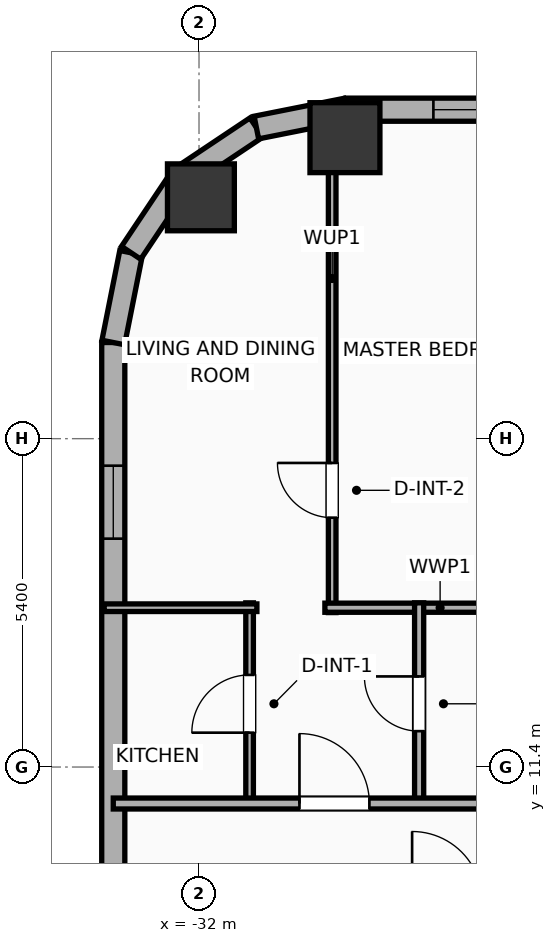
"""IFC4 building model, lengths in metres.
Left out: names, types, materials, properties, quantities, classifications, styles, units other than length and angle.
Written with IfcOpenShell. Run it as: python <this file> out.ifc"""

import sys

from ifc_helpers import new_model, si_unit, direction, frame, frame_2d, origin, origin_2d, place, context, subcontext, project, spatial, rectangle, hollow_rectangle, hollow_circle, extrude, element, fill, save


model = new_model("IFC4")
c1 = context("Model", 3, precision=1e-05, world=origin(), true_north=direction((0.0, 1.0)))
c2 = subcontext(c1, "Body", "Model", "MODEL_VIEW")
j1 = project(units=[si_unit("LENGTHUNIT", "METRE"), si_unit("PLANEANGLEUNIT", "RADIAN")], contexts=[c1])
p1 = place(None, origin())
s1 = spatial("IfcSite", under=j1, at=p1, CompositionType="ELEMENT")
p2 = place(p1, origin())
s2 = spatial("IfcBuilding", under=s1, at=p2, CompositionType="ELEMENT")
p3 = place(p2, frame((0.0, 0.0, 29.9)))
s3 = spatial("IfcBuildingStorey", under=s2, at=p3, CompositionType="ELEMENT", Elevation=29.9)
p4 = place(p3, frame((-29.6, 21.75, 0.0), z_axis=(0.0, 0.0, 1.0), x_axis=(1.0, 0.0, 0.0)))
e1 = element("IfcColumn", 1, at=p4, inside=s3, PredefinedType="COLUMN", context=c2, shape_type="SweptSolid", body=[
    extrude(hollow_rectangle(XDim=1.15, YDim=1.15, WallThickness=0.04, at=origin_2d()), origin(), (0.0, 0.0, 1.0), 3.9),
])
p5 = place(p3, frame((-31.969, 20.769, 0.0), z_axis=(0.0, 0.0, 1.0), x_axis=(1.0, 0.0, 0.0)))
e2 = element("IfcColumn", 2, at=p5, inside=s3, PredefinedType="COLUMN", context=c2, shape_type="SweptSolid", body=[
    extrude(hollow_circle(Radius=0.55, WallThickness=0.036, at=origin_2d()), origin(), (0.0, 0.0, 1.0), 3.9),
])
p6 = place(p3, frame((-33.41, -18.381, 0.0), z_axis=(0.0, 0.0, 1.0), x_axis=(0.0, 1.0, 0.0)))
e3 = element("IfcWall", 3, at=p6, inside=s3, PredefinedType="ELEMENTEDWALL", context=c2, shape_type="SweptSolid", body=[
    extrude(rectangle(XDim=36.763, YDim=0.38, at=frame_2d((18.381, 0.0))), origin(), (0.0, 0.0, 1.0), 2.54),
])
p7 = place(p6, frame((33.537, 0.0, 0.75)))
e4 = element("IfcOpeningElement", 4, at=p7, cuts=e3, PredefinedType="OPENING", context=c2, shape_type="SweptSolid", body=[
    extrude(rectangle(XDim=1.2, YDim=1.63, at=frame_2d((0.6, 0.815))), frame((0.0, 0.2, 0.0), z_axis=(0.0, -1.0, 0.0), x_axis=(1.0, 0.0, 0.0)), (0.0, 0.0, 1.0), 0.4),
])
p8 = place(p6, frame((22.476, 0.0, 0.75)))
e5 = element("IfcOpeningElement", 5, at=p8, cuts=e3, PredefinedType="OPENING", context=c2, shape_type="SweptSolid", body=[
    extrude(rectangle(XDim=1.2, YDim=1.63, at=frame_2d((0.6, 0.815))), frame((0.0, 0.2, 0.0), z_axis=(0.0, -1.0, 0.0), x_axis=(1.0, 0.0, 0.0)), (0.0, 0.0, 1.0), 0.4),
])
p9 = place(p6, frame((13.226, 0.0, 0.75)))
e6 = element("IfcOpeningElement", 6, at=p9, cuts=e3, PredefinedType="OPENING", context=c2, shape_type="SweptSolid", body=[
    extrude(rectangle(XDim=1.2, YDim=1.63, at=frame_2d((0.6, 0.815))), frame((0.0, 0.2, 0.0), z_axis=(0.0, -1.0, 0.0), x_axis=(1.0, 0.0, 0.0)), (0.0, 0.0, 1.0), 0.4),
])
p10 = place(p3, frame((-33.41, 18.381, 0.0), z_axis=(0.0, 0.0, 1.0), x_axis=(0.195086038585, 0.980786132421, 0.0)))
e7 = element("IfcWall", 7, at=p10, inside=s3, PredefinedType="ELEMENTEDWALL", context=c2, shape_type="SweptSolid", body=[
    extrude(rectangle(XDim=1.504, YDim=0.38, at=frame_2d((0.752, 0.0))), origin(), (0.0, 0.0, 1.0), 3.65),
])
p11 = place(p3, frame((-33.116, 19.857, 0.0), z_axis=(0.0, 0.0, 1.0), x_axis=(0.555572577804, 0.831468045563, 0.0)))
e8 = element("IfcWall", 8, at=p11, inside=s3, PredefinedType="ELEMENTEDWALL", context=c2, shape_type="SweptSolid", body=[
    extrude(rectangle(XDim=1.485, YDim=0.38, at=frame_2d((0.742, 0.0))), origin(), (0.0, 0.0, 1.0), 3.65),
])
p12 = place(p3, frame((-32.292, 21.091, 0.0), z_axis=(0.0, 0.0, 1.0), x_axis=(0.831442848281, 0.555610286119, 0.0)))
e9 = element("IfcWall", 9, at=p12, inside=s3, PredefinedType="ELEMENTEDWALL", context=c2, shape_type="SweptSolid", body=[
    extrude(rectangle(XDim=1.485, YDim=0.38, at=frame_2d((0.743, 0.0))), origin(), (0.0, 0.0, 1.0), 2.54),
])
p13 = place(p3, frame((-31.057, 21.917, 0.0), z_axis=(0.0, 0.0, 1.0), x_axis=(0.980786132421, 0.195086038585, 0.0)))
e10 = element("IfcWall", 10, at=p13, inside=s3, PredefinedType="ELEMENTEDWALL", context=c2, shape_type="SweptSolid", body=[
    extrude(rectangle(XDim=1.504, YDim=0.38, at=frame_2d((0.752, 0.0))), origin(), (0.0, 0.0, 1.0), 2.54),
])
p14 = place(p3, frame((-29.581, 22.21, 0.0), z_axis=(0.0, 0.0, 1.0), x_axis=(1.0, 0.0, 0.0)))
e11 = element("IfcWall", 11, at=p14, inside=s3, PredefinedType="ELEMENTEDWALL", context=c2, shape_type="SweptSolid", body=[
    extrude(rectangle(XDim=51.963, YDim=0.38, at=frame_2d((25.981, 0.0))), origin(), (0.0, 0.0, 1.0), 2.54),
])
p15 = place(p14, frame((5.81, 0.0, 0.75)))
e12 = element("IfcOpeningElement", 12, at=p15, cuts=e11, PredefinedType="OPENING", context=c2, shape_type="SweptSolid", body=[
    extrude(rectangle(XDim=2.4, YDim=1.63, at=frame_2d((1.2, 0.815))), frame((0.0, 0.2, 0.0), z_axis=(0.0, -1.0, 0.0), x_axis=(1.0, 0.0, 0.0)), (0.0, 0.0, 1.0), 0.4),
])
p16 = place(p14, frame((42.952, 0.0, 0.75)))
e13 = element("IfcOpeningElement", 13, at=p16, cuts=e11, PredefinedType="OPENING", context=c2, shape_type="SweptSolid", body=[
    extrude(rectangle(XDim=2.4, YDim=1.63, at=frame_2d((1.2, 0.815))), frame((0.0, 0.2, 0.0), z_axis=(0.0, -1.0, 0.0), x_axis=(1.0, 0.0, 0.0)), (0.0, 0.0, 1.0), 0.4),
])
p17 = place(p14, frame((1.436, 0.0, 0.75)))
e14 = element("IfcOpeningElement", 14, at=p17, cuts=e11, PredefinedType="OPENING", context=c2, shape_type="SweptSolid", body=[
    extrude(rectangle(XDim=1.2, YDim=1.63, at=frame_2d((0.6, 0.815))), frame((0.0, 0.2, 0.0), z_axis=(0.0, -1.0, 0.0), x_axis=(1.0, 0.0, 0.0)), (0.0, 0.0, 1.0), 0.4),
])
p18 = place(p14, frame((3.686, 0.0, 0.75)))
e15 = element("IfcOpeningElement", 15, at=p18, cuts=e11, PredefinedType="OPENING", context=c2, shape_type="SweptSolid", body=[
    extrude(rectangle(XDim=1.2, YDim=1.63, at=frame_2d((0.6, 0.815))), frame((0.0, 0.2, 0.0), z_axis=(0.0, -1.0, 0.0), x_axis=(1.0, 0.0, 0.0)), (0.0, 0.0, 1.0), 0.4),
])
p19 = place(p14, frame((11.221, 0.0, 0.75)))
e16 = element("IfcOpeningElement", 16, at=p19, cuts=e11, PredefinedType="OPENING", context=c2, shape_type="SweptSolid", body=[
    extrude(rectangle(XDim=1.2, YDim=1.63, at=frame_2d((0.6, 0.815))), frame((0.0, 0.2, 0.0), z_axis=(0.0, -1.0, 0.0), x_axis=(1.0, 0.0, 0.0)), (0.0, 0.0, 1.0), 0.4),
])
p20 = place(p14, frame((17.686, 0.0, 0.75)))
e17 = element("IfcOpeningElement", 17, at=p20, cuts=e11, PredefinedType="OPENING", context=c2, shape_type="SweptSolid", body=[
    extrude(rectangle(XDim=1.2, YDim=1.63, at=frame_2d((0.6, 0.815))), frame((0.0, 0.2, 0.0), z_axis=(0.0, -1.0, 0.0), x_axis=(1.0, 0.0, 0.0)), (0.0, 0.0, 1.0), 0.4),
])
p21 = place(p14, frame((14.886, 0.0, 0.75)))
e18 = element("IfcOpeningElement", 18, at=p21, cuts=e11, PredefinedType="OPENING", context=c2, shape_type="SweptSolid", body=[
    extrude(rectangle(XDim=1.2, YDim=1.63, at=frame_2d((0.6, 0.815))), frame((0.0, 0.2, 0.0), z_axis=(0.0, -1.0, 0.0), x_axis=(1.0, 0.0, 0.0)), (0.0, 0.0, 1.0), 0.4),
])
p22 = place(p14, frame((22.181, 0.0, 0.75)))
e19 = element("IfcOpeningElement", 19, at=p22, cuts=e11, PredefinedType="OPENING", context=c2, shape_type="SweptSolid", body=[
    extrude(rectangle(XDim=1.2, YDim=1.63, at=frame_2d((0.6, 0.815))), frame((0.0, 0.2, 0.0), z_axis=(0.0, -1.0, 0.0), x_axis=(1.0, 0.0, 0.0)), (0.0, 0.0, 1.0), 0.4),
])
p23 = place(p14, frame((28.926, 0.0, 0.75)))
e20 = element("IfcOpeningElement", 20, at=p23, cuts=e11, PredefinedType="OPENING", context=c2, shape_type="SweptSolid", body=[
    extrude(rectangle(XDim=1.2, YDim=1.63, at=frame_2d((0.6, 0.815))), frame((0.0, 0.2, 0.0), z_axis=(0.0, -1.0, 0.0), x_axis=(1.0, 0.0, 0.0)), (0.0, 0.0, 1.0), 0.4),
])
p24 = place(p14, frame((26.126, 0.0, 0.75)))
e21 = element("IfcOpeningElement", 21, at=p24, cuts=e11, PredefinedType="OPENING", context=c2, shape_type="SweptSolid", body=[
    extrude(rectangle(XDim=1.2, YDim=1.63, at=frame_2d((0.6, 0.815))), frame((0.0, 0.2, 0.0), z_axis=(0.0, -1.0, 0.0), x_axis=(1.0, 0.0, 0.0)), (0.0, 0.0, 1.0), 0.4),
])
p25 = place(p14, frame((32.276, 0.0, 0.75)))
e22 = element("IfcOpeningElement", 22, at=p25, cuts=e11, PredefinedType="OPENING", context=c2, shape_type="SweptSolid", body=[
    extrude(rectangle(XDim=1.2, YDim=1.63, at=frame_2d((0.6, 0.815))), frame((0.0, 0.2, 0.0), z_axis=(0.0, -1.0, 0.0), x_axis=(1.0, 0.0, 0.0)), (0.0, 0.0, 1.0), 0.4),
])
p26 = place(p14, frame((35.076, 0.0, 0.75)))
e23 = element("IfcOpeningElement", 23, at=p26, cuts=e11, PredefinedType="OPENING", context=c2, shape_type="SweptSolid", body=[
    extrude(rectangle(XDim=1.2, YDim=1.63, at=frame_2d((0.6, 0.815))), frame((0.0, 0.2, 0.0), z_axis=(0.0, -1.0, 0.0), x_axis=(1.0, 0.0, 0.0)), (0.0, 0.0, 1.0), 0.4),
])
p27 = place(p14, frame((38.981, 0.0, 0.75)))
e24 = element("IfcOpeningElement", 24, at=p27, cuts=e11, PredefinedType="OPENING", context=c2, shape_type="SweptSolid", body=[
    extrude(rectangle(XDim=1.2, YDim=1.63, at=frame_2d((0.6, 0.815))), frame((0.0, 0.2, 0.0), z_axis=(0.0, -1.0, 0.0), x_axis=(1.0, 0.0, 0.0)), (0.0, 0.0, 1.0), 0.4),
])
p28 = place(p14, frame((46.276, 0.0, 0.75)))
e25 = element("IfcOpeningElement", 25, at=p28, cuts=e11, PredefinedType="OPENING", context=c2, shape_type="SweptSolid", body=[
    extrude(rectangle(XDim=1.2, YDim=1.63, at=frame_2d((0.6, 0.815))), frame((0.0, 0.2, 0.0), z_axis=(0.0, -1.0, 0.0), x_axis=(1.0, 0.0, 0.0)), (0.0, 0.0, 1.0), 0.4),
])
p29 = place(p14, frame((48.927, 0.0, 0.75)))
e26 = element("IfcOpeningElement", 26, at=p29, cuts=e11, PredefinedType="OPENING", context=c2, shape_type="SweptSolid", body=[
    extrude(rectangle(XDim=1.2, YDim=1.63, at=frame_2d((0.6, 0.815))), frame((0.0, 0.2, 0.0), z_axis=(0.0, -1.0, 0.0), x_axis=(1.0, 0.0, 0.0)), (0.0, 0.0, 1.0), 0.4),
])
p30 = place(p3, frame((-29.81, 13.94, 0.0), z_axis=(0.0, 0.0, 1.0), x_axis=(0.0, 1.0, 0.0)))
e27 = element("IfcWall", 27, at=p30, inside=s3, PredefinedType="PARTITIONING", context=c2, shape_type="SweptSolid", body=[
    extrude(rectangle(XDim=8.377, YDim=0.125, at=frame_2d((4.189, 0.0))), origin(), (0.0, 0.0, 1.0), 3.65),
])
p31 = place(p30, frame((1.561, 0.0, 0.0)))
e28 = element("IfcOpeningElement", 28, at=p31, cuts=e27, PredefinedType="OPENING", context=c2, shape_type="SweptSolid", body=[
    extrude(rectangle(XDim=0.9, YDim=2.05, at=frame_2d((0.45, 1.025))), frame((0.0, 0.073, 0.0), z_axis=(0.0, -1.0, 0.0), x_axis=(1.0, 0.0, 0.0)), (0.0, 0.0, 1.0), 0.145),
])
p32 = place(p3, frame((-29.93, 14.02, 0.0), z_axis=(0.0, 0.0, 1.0), x_axis=(1.0, 0.0, 0.0)))
e29 = element("IfcWall", 29, at=p32, inside=s3, PredefinedType="PLUMBINGWALL", context=c2, shape_type="SweptSolid", body=[
    extrude(rectangle(XDim=3.79, YDim=0.15, at=frame_2d((1.895, 0.0))), origin(), (0.0, 0.0, 1.0), 3.65),
])
p33 = place(p3, frame((-31.168, 10.78, 0.0), z_axis=(0.0, 0.0, 1.0), x_axis=(0.0, 1.0, 0.0)))
e30 = element("IfcWall", 30, at=p33, inside=s3, PredefinedType="PARTITIONING", context=c2, shape_type="SweptSolid", body=[
    extrude(rectangle(XDim=3.32, YDim=0.125, at=frame_2d((1.66, 0.0))), origin(), (0.0, 0.0, 1.0), 3.65),
])
p34 = place(p33, frame((1.185, 0.0, 0.0)))
e31 = element("IfcOpeningElement", 31, at=p34, cuts=e30, PredefinedType="OPENING", context=c2, shape_type="SweptSolid", body=[
    extrude(rectangle(XDim=0.95, YDim=2.05, at=frame_2d((0.475, 1.025))), frame((0.0, 0.073, 0.0), z_axis=(0.0, -1.0, 0.0), x_axis=(1.0, 0.0, 0.0)), (0.0, 0.0, 1.0), 0.145),
])
p35 = place(p3, frame((-33.56, 14.02, 0.0), z_axis=(0.0, 0.0, 1.0), x_axis=(1.0, 0.0, 0.0)))
e32 = element("IfcWall", 32, at=p35, inside=s3, PredefinedType="PARTITIONING", context=c2, shape_type="SweptSolid", body=[
    extrude(rectangle(XDim=2.512, YDim=0.125, at=frame_2d((1.256, 0.0))), origin(), (0.0, 0.0, 1.0), 3.65),
])
p36 = place(p3, frame((-28.38, 10.78, 0.0), z_axis=(0.0, 0.0, 1.0), x_axis=(0.0, 1.0, 0.0)))
e33 = element("IfcWall", 33, at=p36, inside=s3, PredefinedType="PLUMBINGWALL", context=c2, shape_type="SweptSolid", body=[
    extrude(rectangle(XDim=3.32, YDim=0.15, at=frame_2d((1.66, 0.0))), origin(), (0.0, 0.0, 1.0), 3.65),
])
p37 = place(p36, frame((1.21, 0.0, 0.0)))
e34 = element("IfcOpeningElement", 34, at=p37, cuts=e33, PredefinedType="OPENING", context=c2, shape_type="SweptSolid", body=[
    extrude(rectangle(XDim=0.9, YDim=2.05, at=frame_2d((0.45, 1.025))), frame((0.0, 0.085, 0.0), z_axis=(0.0, -1.0, 0.0), x_axis=(1.0, 0.0, 0.0)), (0.0, 0.0, 1.0), 0.17),
])
p38 = place(p3, frame((-33.41, 10.8, 0.0), z_axis=(0.0, 0.0, 1.0), x_axis=(1.0, 0.0, 0.0)))
e35 = element("IfcWall", 35, at=p38, inside=s3, PredefinedType="PARTITIONING", context=c2, shape_type="SweptSolid", body=[
    extrude(rectangle(XDim=59.62, YDim=0.18, at=frame_2d((29.81, 0.0))), origin(), (0.0, 0.0, 1.0), 3.65),
])
p39 = place(p38, frame((3.062, 0.0, 0.0)))
e36 = element("IfcOpeningElement", 36, at=p39, cuts=e35, PredefinedType="OPENING", context=c2, shape_type="SweptSolid", body=[
    extrude(rectangle(XDim=1.15, YDim=2.05, at=frame_2d((0.575, 1.025))), frame((0.0, 0.1, 0.0), z_axis=(0.0, -1.0, 0.0), x_axis=(1.0, 0.0, 0.0)), (0.0, 0.0, 1.0), 0.2),
])
p40 = place(p38, frame((10.312, 0.0, 0.0)))
e37 = element("IfcOpeningElement", 37, at=p40, cuts=e35, PredefinedType="OPENING", context=c2, shape_type="SweptSolid", body=[
    extrude(rectangle(XDim=1.15, YDim=2.05, at=frame_2d((0.575, 1.025))), frame((0.0, 0.1, 0.0), z_axis=(0.0, -1.0, 0.0), x_axis=(1.0, 0.0, 0.0)), (0.0, 0.0, 1.0), 0.2),
])
p41 = place(p38, frame((15.153, 0.0, 0.0)))
e38 = element("IfcOpeningElement", 38, at=p41, cuts=e35, PredefinedType="OPENING", context=c2, shape_type="SweptSolid", body=[
    extrude(rectangle(XDim=0.9, YDim=2.05, at=frame_2d((0.45, 1.025))), frame((0.0, 0.1, 0.0), z_axis=(0.0, -1.0, 0.0), x_axis=(1.0, 0.0, 0.0)), (0.0, 0.0, 1.0), 0.2),
])
p42 = place(p38, frame((21.508, 0.0, 0.0)))
e39 = element("IfcOpeningElement", 39, at=p42, cuts=e35, PredefinedType="OPENING", context=c2, shape_type="SweptSolid", body=[
    extrude(rectangle(XDim=1.15, YDim=2.05, at=frame_2d((0.575, 1.025))), frame((0.0, 0.1, 0.0), z_axis=(0.0, -1.0, 0.0), x_axis=(1.0, 0.0, 0.0)), (0.0, 0.0, 1.0), 0.2),
])
p43 = place(p38, frame((26.355, 0.0, 0.0)))
e40 = element("IfcOpeningElement", 40, at=p43, cuts=e35, PredefinedType="OPENING", context=c2, shape_type="SweptSolid", body=[
    extrude(rectangle(XDim=0.9, YDim=2.05, at=frame_2d((0.45, 1.025))), frame((0.0, 0.1, 0.0), z_axis=(0.0, -1.0, 0.0), x_axis=(1.0, 0.0, 0.0)), (0.0, 0.0, 1.0), 0.2),
])
p44 = place(p38, frame((32.753, 0.0, 0.0)))
e41 = element("IfcOpeningElement", 41, at=p44, cuts=e35, PredefinedType="OPENING", context=c2, shape_type="SweptSolid", body=[
    extrude(rectangle(XDim=1.15, YDim=2.05, at=frame_2d((0.575, 1.025))), frame((0.0, 0.1, 0.0), z_axis=(0.0, -1.0, 0.0), x_axis=(1.0, 0.0, 0.0)), (0.0, 0.0, 1.0), 0.2),
])
p45 = place(p38, frame((36.163, 0.0, 0.0)))
e42 = element("IfcOpeningElement", 42, at=p45, cuts=e35, PredefinedType="OPENING", context=c2, shape_type="SweptSolid", body=[
    extrude(rectangle(XDim=1.15, YDim=2.05, at=frame_2d((0.575, 1.025))), frame((0.0, 0.1, 0.0), z_axis=(0.0, -1.0, 0.0), x_axis=(1.0, 0.0, 0.0)), (0.0, 0.0, 1.0), 0.2),
])
p46 = place(p38, frame((43.156, 0.0, 0.0)))
e43 = element("IfcOpeningElement", 43, at=p46, cuts=e35, PredefinedType="OPENING", context=c2, shape_type="SweptSolid", body=[
    extrude(rectangle(XDim=0.9, YDim=2.05, at=frame_2d((0.45, 1.025))), frame((0.0, 0.1, 0.0), z_axis=(0.0, -1.0, 0.0), x_axis=(1.0, 0.0, 0.0)), (0.0, 0.0, 1.0), 0.2),
])
p47 = place(p38, frame((47.36, 0.0, 0.0)))
e44 = element("IfcOpeningElement", 44, at=p47, cuts=e35, PredefinedType="OPENING", context=c2, shape_type="SweptSolid", body=[
    extrude(rectangle(XDim=1.15, YDim=2.05, at=frame_2d((0.575, 1.025))), frame((0.0, 0.1, 0.0), z_axis=(0.0, -1.0, 0.0), x_axis=(1.0, 0.0, 0.0)), (0.0, 0.0, 1.0), 0.2),
])
p48 = place(p38, frame((55.337, 0.0, 0.0)))
e45 = element("IfcOpeningElement", 45, at=p48, cuts=e35, PredefinedType="OPENING", context=c2, shape_type="SweptSolid", body=[
    extrude(rectangle(XDim=1.15, YDim=2.05, at=frame_2d((0.575, 1.025))), frame((0.0, 0.1, 0.0), z_axis=(0.0, -1.0, 0.0), x_axis=(1.0, 0.0, 0.0)), (0.0, 0.0, 1.0), 0.2),
])
p49 = place(p7, origin())
e46 = element("IfcWindow", 46, at=p49, inside=s3, PartitioningType="SINGLE_PANEL", PredefinedType="WINDOW", context=c2, shape_type="SweptSolid", body=[
    extrude(rectangle(XDim=1.2, YDim=1.63, at=frame_2d((0.6, 0.815))), frame((0.0, 0.03, 0.0), z_axis=(0.0, -1.0, 0.0), x_axis=(1.0, 0.0, 0.0)), (0.0, 0.0, 1.0), 0.06),
])
fill(e4, e46)
p50 = place(p17, origin())
e47 = element("IfcWindow", 47, at=p50, inside=s3, PartitioningType="SINGLE_PANEL", PredefinedType="WINDOW", context=c2, shape_type="SweptSolid", body=[
    extrude(rectangle(XDim=1.2, YDim=1.63, at=frame_2d((0.6, 0.815))), frame((0.0, 0.03, 0.0), z_axis=(0.0, -1.0, 0.0), x_axis=(1.0, 0.0, 0.0)), (0.0, 0.0, 1.0), 0.06),
])
fill(e14, e47)
p51 = place(p31, origin())
e48 = element("IfcDoor", 48, at=p51, inside=s3, OperationType="SINGLE_SWING_RIGHT", PredefinedType="DOOR", context=c2, shape_type="SweptSolid", body=[
    extrude(rectangle(XDim=0.9, YDim=2.05, at=frame_2d((0.45, 1.025))), frame((0.0, 0.025, 0.0), z_axis=(0.0, -1.0, 0.0), x_axis=(1.0, 0.0, 0.0)), (0.0, 0.0, 1.0), 0.05),
])
fill(e28, e48)
p52 = place(p34, origin())
e49 = element("IfcDoor", 49, at=p52, inside=s3, OperationType="SINGLE_SWING_LEFT", PredefinedType="DOOR", context=c2, shape_type="SweptSolid", body=[
    extrude(rectangle(XDim=0.95, YDim=2.05, at=frame_2d((0.475, 1.025))), frame((0.0, 0.025, 0.0), z_axis=(0.0, -1.0, 0.0), x_axis=(1.0, 0.0, 0.0)), (0.0, 0.0, 1.0), 0.05),
])
fill(e31, e49)
p53 = place(p37, origin())
e50 = element("IfcDoor", 50, at=p53, inside=s3, OperationType="SINGLE_SWING_RIGHT", PredefinedType="DOOR", context=c2, shape_type="SweptSolid", body=[
    extrude(rectangle(XDim=0.9, YDim=2.05, at=frame_2d((0.45, 1.025))), frame((0.0, 0.025, 0.0), z_axis=(0.0, -1.0, 0.0), x_axis=(1.0, 0.0, 0.0)), (0.0, 0.0, 1.0), 0.05),
])
fill(e34, e50)
p54 = place(p39, origin())
e51 = element("IfcDoor", 51, at=p54, inside=s3, OperationType="SINGLE_SWING_LEFT", PredefinedType="DOOR", context=c2, shape_type="SweptSolid", body=[
    extrude(rectangle(XDim=1.15, YDim=2.05, at=frame_2d((0.575, 1.025))), frame((0.0, 0.025, 0.0), z_axis=(0.0, -1.0, 0.0), x_axis=(1.0, 0.0, 0.0)), (0.0, 0.0, 1.0), 0.05),
])
fill(e36, e51)
save(model, sys.argv[1])
